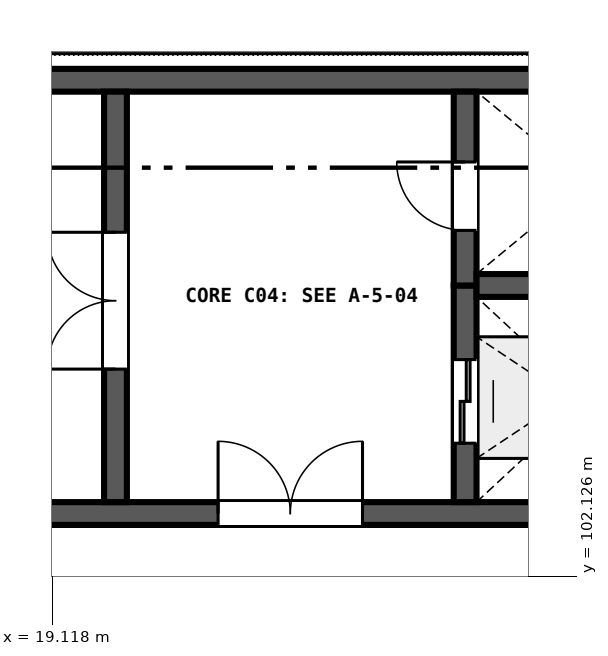
"""IFC4 building model, lengths in metres.
Left out: names, types, materials, properties, quantities, classifications, styles, units other than length and angle.
Written with IfcOpenShell. Run it as: python <this file> out.ifc"""

import sys

from ifc_helpers import new_model, si_unit, direction, frame, frame_2d, origin, place, context, subcontext, project, spatial, rectangle, extrude, element, fill, save


model = new_model("IFC4")
c1 = context("Model", 3, precision=1e-05, world=origin(), true_north=direction((0.0, 1.0)))
c2 = subcontext(c1, "Body", "Model", "MODEL_VIEW")
j1 = project(units=[si_unit("LENGTHUNIT", "METRE"), si_unit("PLANEANGLEUNIT", "RADIAN")], contexts=[c1])
p1 = place(None, origin())
s1 = spatial("IfcSite", under=j1, at=p1, CompositionType="ELEMENT")
p2 = place(p1, origin())
s2 = spatial("IfcBuilding", under=s1, at=p2, CompositionType="ELEMENT")
p3 = place(p2, frame((0.0, 0.0, 14.4)))
s3 = spatial("IfcBuildingStorey", under=s2, at=p3, CompositionType="ELEMENT", Elevation=14.4)
p4 = place(p3, frame((9.9, 102.95, 0.0), z_axis=(0.0, 0.0, 1.0), x_axis=(1.0, 0.0, 0.0)))
e1 = element("IfcWall", 1, at=p4, inside=s3, PredefinedType="SHEAR", context=c2, shape_type="SweptSolid", body=[
    extrude(rectangle(XDim=18.0, YDim=0.3, at=frame_2d((9.0, 0.0))), origin(), (0.0, 0.0, 1.0), 4.48),
])
p5 = place(p4, frame((11.4, 0.0, 0.0)))
e2 = element("IfcOpeningElement", 2, at=p5, cuts=e1, PredefinedType="OPENING", context=c2, shape_type="SweptSolid", body=[
    extrude(rectangle(XDim=1.9, YDim=2.25, at=frame_2d((0.95, 1.125))), frame((0.0, 0.16, 0.0), z_axis=(0.0, -1.0, 0.0), x_axis=(1.0, 0.0, 0.0)), (0.0, 0.0, 1.0), 0.32),
])
p6 = place(p3, frame((27.9, 108.65, 0.0), z_axis=(0.0, 0.0, 1.0), x_axis=(-1.0, 0.0, 0.0)))
e3 = element("IfcWall", 3, at=p6, inside=s3, PredefinedType="SHEAR", context=c2, shape_type="SweptSolid", body=[
    extrude(rectangle(XDim=18.0, YDim=0.3, at=frame_2d((9.0, 0.0))), origin(), (0.0, 0.0, 1.0), 4.48),
])
p7 = place(p3, frame((19.95, 103.1, 0.0), z_axis=(0.0, 0.0, 1.0), x_axis=(0.0, 1.0, 0.0)))
e4 = element("IfcWall", 4, at=p7, inside=s3, PredefinedType="SHEAR", context=c2, shape_type="SweptSolid", body=[
    extrude(rectangle(XDim=5.4, YDim=0.3, at=frame_2d((2.7, 0.0))), origin(), (0.0, 0.0, 1.0), 4.48),
])
p8 = place(p7, frame((1.75, 0.0, 0.0)))
e5 = element("IfcOpeningElement", 5, at=p8, cuts=e4, PredefinedType="OPENING", context=c2, shape_type="SweptSolid", body=[
    extrude(rectangle(XDim=1.8, YDim=2.25, at=frame_2d((0.9, 1.125))), frame((0.0, 0.16, 0.0), z_axis=(0.0, -1.0, 0.0), x_axis=(1.0, 0.0, 0.0)), (0.0, 0.0, 1.0), 0.32),
])
p9 = place(p3, frame((24.55, 103.1, 0.0), z_axis=(0.0, 0.0, 1.0), x_axis=(0.0, 1.0, 0.0)))
e6 = element("IfcWall", 6, at=p9, inside=s3, PredefinedType="SHEAR", context=c2, shape_type="SweptSolid", body=[
    extrude(rectangle(XDim=2.85, YDim=0.3, at=frame_2d((1.425, 0.0))), origin(), (0.0, 0.0, 1.0), 4.48),
])
p10 = place(p9, frame((0.775, 0.0, 0.0)))
e7 = element("IfcOpeningElement", 7, at=p10, cuts=e6, PredefinedType="OPENING", context=c2, shape_type="SweptSolid", body=[
    extrude(rectangle(XDim=1.1, YDim=2.1, at=frame_2d((0.55, 1.05))), frame((0.0, 0.16, 0.0), z_axis=(0.0, -1.0, 0.0), x_axis=(1.0, 0.0, 0.0)), (0.0, 0.0, 1.0), 0.32),
])
p11 = place(p3, frame((24.55, 105.95, 0.0), z_axis=(0.0, 0.0, 1.0), x_axis=(0.0, 1.0, 0.0)))
e8 = element("IfcWall", 8, at=p11, inside=s3, PredefinedType="SHEAR", context=c2, shape_type="SweptSolid", body=[
    extrude(rectangle(XDim=2.55, YDim=0.3, at=frame_2d((1.275, 0.0))), origin(), (0.0, 0.0, 1.0), 4.48),
])
p12 = place(p11, frame((0.725, 0.0, 0.0)))
e9 = element("IfcOpeningElement", 9, at=p12, cuts=e8, PredefinedType="OPENING", context=c2, shape_type="SweptSolid", body=[
    extrude(rectangle(XDim=0.9, YDim=2.1, at=frame_2d((0.45, 1.05))), frame((0.0, 0.16, 0.0), z_axis=(0.0, -1.0, 0.0), x_axis=(1.0, 0.0, 0.0)), (0.0, 0.0, 1.0), 0.32),
])
p13 = place(p3, frame((24.7, 105.95, 0.0), z_axis=(0.0, 0.0, 1.0), x_axis=(1.0, 0.0, 0.0)))
e10 = element("IfcWall", 10, at=p13, inside=s3, PredefinedType="SHEAR", context=c2, shape_type="SweptSolid", body=[
    extrude(rectangle(XDim=2.9, YDim=0.3, at=frame_2d((1.45, 0.0))), origin(), (0.0, 0.0, 1.0), 4.48),
])
p14 = place(p8, origin())
e11 = element("IfcDoor", 11, at=p14, inside=s3, OperationType="DOUBLE_DOOR_SINGLE_SWING", PredefinedType="DOOR", context=c2, shape_type="SweptSolid", body=[
    extrude(rectangle(XDim=1.8, YDim=2.25, at=frame_2d((0.9, 1.125))), frame((0.0, 0.025, 0.0), z_axis=(0.0, -1.0, 0.0), x_axis=(1.0, 0.0, 0.0)), (0.0, 0.0, 1.0), 0.05),
])
fill(e5, e11)
p15 = place(p12, origin())
e12 = element("IfcDoor", 12, at=p15, inside=s3, OperationType="SINGLE_SWING_RIGHT", PredefinedType="DOOR", context=c2, shape_type="SweptSolid", body=[
    extrude(rectangle(XDim=0.9, YDim=2.1, at=frame_2d((0.45, 1.05))), frame((0.0, 0.025, 0.0), z_axis=(0.0, -1.0, 0.0), x_axis=(1.0, 0.0, 0.0)), (0.0, 0.0, 1.0), 0.05),
])
fill(e9, e12)
p16 = place(p10, origin())
e13 = element("IfcDoor", 13, at=p16, inside=s3, OperationType="DOUBLE_DOOR_SLIDING", PredefinedType="DOOR", context=c2, shape_type="SweptSolid", body=[
    extrude(rectangle(XDim=1.1, YDim=2.1, at=frame_2d((0.55, 1.05))), frame((0.0, 0.025, 0.0), z_axis=(0.0, -1.0, 0.0), x_axis=(1.0, 0.0, 0.0)), (0.0, 0.0, 1.0), 0.05),
])
fill(e7, e13)
p17 = place(p5, origin())
e14 = element("IfcDoor", 14, at=p17, inside=s3, OperationType="DOUBLE_DOOR_SINGLE_SWING", PredefinedType="DOOR", context=c2, shape_type="SweptSolid", body=[
    extrude(rectangle(XDim=1.9, YDim=2.25, at=frame_2d((0.95, 1.125))), frame((0.0, 0.025, 0.0), z_axis=(0.0, -1.0, 0.0), x_axis=(1.0, 0.0, 0.0)), (0.0, 0.0, 1.0), 0.05),
])
fill(e2, e14)
save(model, sys.argv[1])
